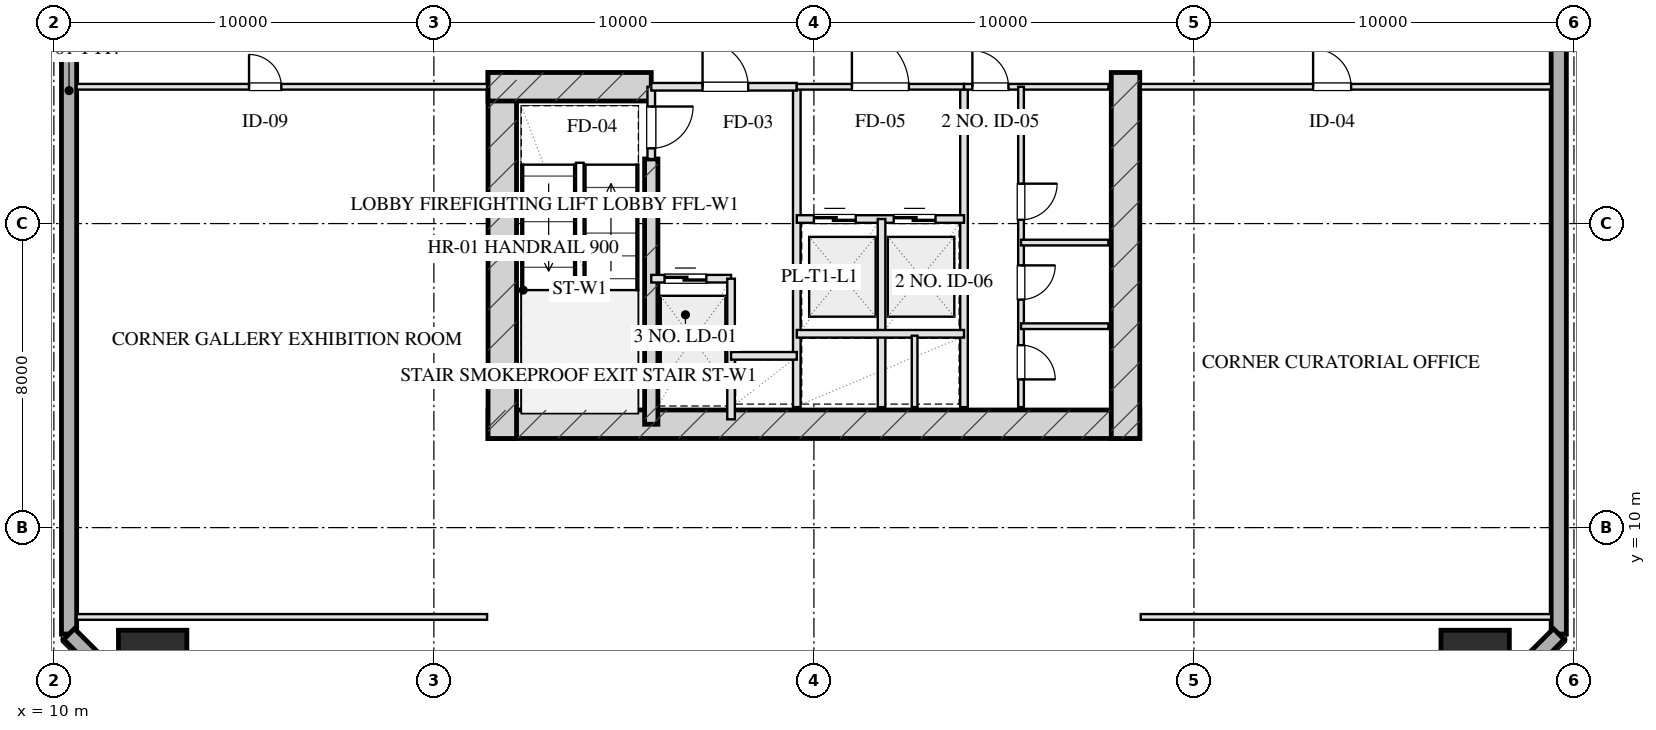
"""IFC4 building model, lengths in metres.
Left out: names, types, materials, properties, quantities, classifications, styles, units other than length and angle.
Written with IfcOpenShell. Run it as: python <this file> out.ifc"""

import sys

from ifc_helpers import new_model, si_unit, direction, frame, frame_2d, origin, origin_2d, place, context, subcontext, project, spatial, rectangle, hollow_rectangle, extrude, element, fill, save


model = new_model("IFC4")
c1 = context("Model", 3, precision=1e-05, world=origin(), true_north=direction((0.0, 1.0)))
c2 = subcontext(c1, "Body", "Model", "MODEL_VIEW")
j1 = project(units=[si_unit("LENGTHUNIT", "METRE"), si_unit("PLANEANGLEUNIT", "RADIAN")], contexts=[c1])
p1 = place(None, origin())
s1 = spatial("IfcSite", under=j1, at=p1, CompositionType="ELEMENT")
p2 = place(p1, origin())
s2 = spatial("IfcBuilding", under=s1, at=p2, CompositionType="ELEMENT")
p3 = place(p2, frame((0.0, 0.0, 34.0)))
s3 = spatial("IfcBuildingStorey", under=s2, at=p3, CompositionType="ELEMENT", Elevation=34.0)
p4 = place(p3, frame((21.425, 12.72, 0.0), z_axis=(0.0, 0.0, 1.0), x_axis=(1.0, 0.0, 0.0)))
e1 = element("IfcWall", 1, at=p4, inside=s3, PredefinedType="SHEAR", context=c2, shape_type="SweptSolid", body=[
    extrude(rectangle(XDim=17.15, YDim=0.75, at=frame_2d((8.575, 0.0))), origin(), (0.0, 0.0, 1.0), 4.0),
])
for number, where, z_axis, x_axis in (
    (2, (21.8, 21.975, 0.0), (0.0, 0.0, 1.0), (0.0, -1.0, 0.0)),
    (3, (38.2, 21.975, 0.0), (0.0, 0.0, 1.0), (0.0, -1.0, 0.0)),
):
    element("IfcWall", number, at=place(p3, frame(where, z_axis=z_axis, x_axis=x_axis)), inside=s3, PredefinedType="SHEAR", context=c2, shape_type="SweptSolid", body=[
        extrude(rectangle(XDim=9.63, YDim=0.75, at=frame_2d((4.815, 0.0))), origin(), (0.0, 0.0, 1.0), 4.0),
    ])
p5 = place(p3, frame((25.72, 19.7, 0.0), z_axis=(0.0, 0.0, 1.0), x_axis=(0.0, -1.0, 0.0)))
e4 = element("IfcWall", 4, at=p5, inside=s3, PredefinedType="SHEAR", context=c2, shape_type="SweptSolid", body=[
    extrude(rectangle(XDim=6.98, YDim=0.35, at=frame_2d((3.49, 0.0))), origin(), (0.0, 0.0, 1.0), 4.0),
])
p6 = place(p3, frame((21.425, 21.6, 0.0), z_axis=(0.0, 0.0, 1.0), x_axis=(1.0, 0.0, 0.0)))
e5 = element("IfcWall", 5, at=p6, inside=s3, PredefinedType="SHEAR", context=c2, shape_type="SweptSolid", body=[
    extrude(rectangle(XDim=4.295, YDim=0.75, at=frame_2d((2.147, 0.0))), origin(), (0.0, 0.0, 1.0), 4.0),
])
for number, where, z_axis, x_axis in (
    (6, (12.6, 6.4, 0.0), (0.0, 0.0, 1.0), (1.0, 0.0, 0.0)),
    (7, (47.4, 6.4, 0.0), (0.0, 0.0, 1.0), (1.0, 0.0, 0.0)),
):
    element("IfcColumn", number, at=place(p3, frame(where, z_axis=z_axis, x_axis=x_axis)), inside=s3, PredefinedType="COLUMN", context=c2, shape_type="SweptSolid", body=[
        extrude(hollow_rectangle(XDim=1.8, YDim=1.8, WallThickness=0.06, at=origin_2d()), origin(), (0.0, 0.0, 1.0), 4.001),
    ])
p7 = place(p3, frame((10.4, 7.2, 0.0), z_axis=(0.0, 0.0, 1.0), x_axis=(0.0, 1.0, 0.0)))
e8 = element("IfcWall", 8, at=p7, inside=s3, PredefinedType="SOLIDWALL", context=c2, shape_type="SweptSolid", body=[
    extrude(rectangle(XDim=53.6, YDim=0.4, at=frame_2d((26.8, 0.0))), origin(), (0.0, 0.0, 1.0), 3.16),
])
p8 = place(p7, frame((22.95, 0.0, 0.75)))
e9 = element("IfcOpeningElement", 9, at=p8, cuts=e8, PredefinedType="OPENING", context=c2, shape_type="SweptSolid", body=[
    extrude(rectangle(XDim=2.5, YDim=1.75, at=frame_2d((1.25, 0.875))), frame((0.0, 0.21, 0.0), z_axis=(0.0, -1.0, 0.0), x_axis=(1.0, 0.0, 0.0)), (0.0, 0.0, 1.0), 0.42),
])
p9 = place(p7, frame((29.35, 0.0, 0.0)))
e10 = element("IfcOpeningElement", 10, at=p9, cuts=e8, PredefinedType="OPENING", context=c2, shape_type="SweptSolid", body=[
    extrude(rectangle(XDim=1.1, YDim=2.15, at=frame_2d((0.55, 1.075))), frame((0.0, 0.21, 0.0), z_axis=(0.0, -1.0, 0.0), x_axis=(1.0, 0.0, 0.0)), (0.0, 0.0, 1.0), 0.42),
])
p10 = place(p3, frame((49.6, 60.8, 0.0), z_axis=(0.0, 0.0, 1.0), x_axis=(0.0, -1.0, 0.0)))
e11 = element("IfcWall", 11, at=p10, inside=s3, PredefinedType="SOLIDWALL", context=c2, shape_type="SweptSolid", body=[
    extrude(rectangle(XDim=53.6, YDim=0.4, at=frame_2d((26.8, 0.0))), origin(), (0.0, 0.0, 1.0), 3.16),
])
p11 = place(p10, frame((28.15, 0.0, 0.75)))
e12 = element("IfcOpeningElement", 12, at=p11, cuts=e11, PredefinedType="OPENING", context=c2, shape_type="SweptSolid", body=[
    extrude(rectangle(XDim=2.5, YDim=1.75, at=frame_2d((1.25, 0.875))), frame((0.0, 0.21, 0.0), z_axis=(0.0, -1.0, 0.0), x_axis=(1.0, 0.0, 0.0)), (0.0, 0.0, 1.0), 0.42),
])
p12 = place(p10, frame((23.15, 0.0, 0.0)))
e13 = element("IfcOpeningElement", 13, at=p12, cuts=e11, PredefinedType="OPENING", context=c2, shape_type="SweptSolid", body=[
    extrude(rectangle(XDim=1.1, YDim=2.15, at=frame_2d((0.55, 1.075))), frame((0.0, 0.21, 0.0), z_axis=(0.0, -1.0, 0.0), x_axis=(1.0, 0.0, 0.0)), (0.0, 0.0, 1.0), 0.42),
])
for number, where, z_axis, x_axis in (
    (14, (49.6, 7.2, 0.0), (0.0, 0.0, 1.0), (-0.707, -0.707, 0.0)),
    (15, (13.4, 4.2, 0.0), (0.0, 0.0, 1.0), (-0.707, 0.707, 0.0)),
):
    element("IfcWall", number, at=place(p3, frame(where, z_axis=z_axis, x_axis=x_axis)), inside=s3, PredefinedType="SOLIDWALL", context=c2, shape_type="SweptSolid", body=[
        extrude(rectangle(XDim=4.243, YDim=0.4, at=frame_2d((2.121, 0.0))), origin(), (0.0, 0.0, 1.0), 3.16),
    ])
p13 = place(p3, frame((25.72, 21.6, 0.0), z_axis=(0.0, 0.0, 1.0), x_axis=(0.0, -1.0, 0.0)))
e16 = element("IfcWall", 16, at=p13, inside=s3, PredefinedType="PARTITIONING", context=c2, shape_type="SweptSolid", body=[
    extrude(rectangle(XDim=1.9, YDim=0.2, at=frame_2d((0.95, 0.0))), origin(), (0.0, 0.0, 1.0), 3.725),
])
p14 = place(p13, frame((0.52, 0.0, 0.0)))
e17 = element("IfcOpeningElement", 17, at=p14, cuts=e16, PredefinedType="OPENING", context=c2, shape_type="SweptSolid", body=[
    extrude(rectangle(XDim=1.1, YDim=2.05, at=frame_2d((0.55, 1.025))), frame((0.0, 0.11, 0.0), z_axis=(0.0, -1.0, 0.0), x_axis=(1.0, 0.0, 0.0)), (0.0, 0.0, 1.0), 0.22),
])
p15 = place(p3, frame((29.55, 21.6, 0.0), z_axis=(0.0, 0.0, 1.0), x_axis=(0.0, -1.0, 0.0)))
e18 = element("IfcWall", 18, at=p15, inside=s3, PredefinedType="PARTITIONING", context=c2, shape_type="SweptSolid", body=[
    extrude(rectangle(XDim=8.43, YDim=0.2, at=frame_2d((4.215, 0.0))), origin(), (0.0, 0.0, 1.0), 3.725),
])
p16 = place(p3, frame((25.72, 21.6, 0.0), z_axis=(0.0, 0.0, 1.0), x_axis=(1.0, 0.0, 0.0)))
e19 = element("IfcWall", 19, at=p16, inside=s3, PredefinedType="PARTITIONING", context=c2, shape_type="SweptSolid", body=[
    extrude(rectangle(XDim=3.83, YDim=0.2, at=frame_2d((1.915, 0.0))), origin(), (0.0, 0.0, 1.0), 3.725),
])
p17 = place(p16, frame((1.35, 0.0, 0.0)))
e20 = element("IfcOpeningElement", 20, at=p17, cuts=e19, PredefinedType="OPENING", context=c2, shape_type="SweptSolid", body=[
    extrude(rectangle(XDim=1.2, YDim=2.05, at=frame_2d((0.6, 1.025))), frame((0.0, 0.11, 0.0), z_axis=(0.0, -1.0, 0.0), x_axis=(1.0, 0.0, 0.0)), (0.0, 0.0, 1.0), 0.22),
])
p18 = place(p3, frame((25.72, 16.55, 0.0), z_axis=(0.0, 0.0, 1.0), x_axis=(1.0, 0.0, 0.0)))
e21 = element("IfcWall", 21, at=p18, inside=s3, PredefinedType="PARTITIONING", context=c2, shape_type="SweptSolid", body=[
    extrude(rectangle(XDim=2.1, YDim=0.2, at=frame_2d((1.05, 0.0))), origin(), (0.0, 0.0, 1.0), 3.725),
])
p19 = place(p18, frame((0.35, 0.0, 0.0)))
e22 = element("IfcOpeningElement", 22, at=p19, cuts=e21, PredefinedType="OPENING", context=c2, shape_type="SweptSolid", body=[
    extrude(rectangle(XDim=1.1, YDim=2.05, at=frame_2d((0.55, 1.025))), frame((0.0, 0.11, 0.0), z_axis=(0.0, -1.0, 0.0), x_axis=(1.0, 0.0, 0.0)), (0.0, 0.0, 1.0), 0.22),
])
p20 = place(p3, frame((27.82, 16.55, 0.0), z_axis=(0.0, 0.0, 1.0), x_axis=(0.0, -1.0, 0.0)))
e23 = element("IfcWall", 23, at=p20, inside=s3, PredefinedType="PARTITIONING", context=c2, shape_type="SweptSolid", body=[
    extrude(rectangle(XDim=3.7, YDim=0.2, at=frame_2d((1.85, 0.0))), origin(), (0.0, 0.0, 1.0), 3.725),
])
p21 = place(p3, frame((27.82, 14.52, 0.0), z_axis=(0.0, 0.0, 1.0), x_axis=(1.0, 0.0, 0.0)))
e24 = element("IfcWall", 24, at=p21, inside=s3, PredefinedType="PARTITIONING", context=c2, shape_type="SweptSolid", body=[
    extrude(rectangle(XDim=1.73, YDim=0.2, at=frame_2d((0.865, 0.0))), origin(), (0.0, 0.0, 1.0), 3.725),
])
p22 = place(p3, frame((33.95, 21.6, 0.0), z_axis=(0.0, 0.0, 1.0), x_axis=(0.0, -1.0, 0.0)))
e25 = element("IfcWall", 25, at=p22, inside=s3, PredefinedType="PARTITIONING", context=c2, shape_type="SweptSolid", body=[
    extrude(rectangle(XDim=8.43, YDim=0.2, at=frame_2d((4.215, 0.0))), origin(), (0.0, 0.0, 1.0), 3.725),
])
p23 = place(p3, frame((29.55, 21.6, 0.0), z_axis=(0.0, 0.0, 1.0), x_axis=(1.0, 0.0, 0.0)))
e26 = element("IfcWall", 26, at=p23, inside=s3, PredefinedType="PARTITIONING", context=c2, shape_type="SweptSolid", body=[
    extrude(rectangle(XDim=4.4, YDim=0.15, at=frame_2d((2.2, 0.0))), origin(), (0.0, 0.0, 1.0), 3.725),
])
p24 = place(p23, frame((1.45, 0.0, 0.0)))
e27 = element("IfcOpeningElement", 27, at=p24, cuts=e26, PredefinedType="OPENING", context=c2, shape_type="SweptSolid", body=[
    extrude(rectangle(XDim=1.5, YDim=2.05, at=frame_2d((0.75, 1.025))), frame((0.0, 0.085, 0.0), z_axis=(0.0, -1.0, 0.0), x_axis=(1.0, 0.0, 0.0)), (0.0, 0.0, 1.0), 0.17),
])
p25 = place(p3, frame((29.55, 18.12, 0.0), z_axis=(0.0, 0.0, 1.0), x_axis=(1.0, 0.0, 0.0)))
e28 = element("IfcWall", 28, at=p25, inside=s3, PredefinedType="PARTITIONING", context=c2, shape_type="SweptSolid", body=[
    extrude(rectangle(XDim=4.4, YDim=0.2, at=frame_2d((2.2, 0.0))), origin(), (0.0, 0.0, 1.0), 3.725),
])
p26 = place(p25, frame((0.45, 0.0, 0.0)))
e29 = element("IfcOpeningElement", 29, at=p26, cuts=e28, PredefinedType="OPENING", context=c2, shape_type="SweptSolid", body=[
    extrude(rectangle(XDim=1.1, YDim=2.05, at=frame_2d((0.55, 1.025))), frame((0.0, 0.11, 0.0), z_axis=(0.0, -1.0, 0.0), x_axis=(1.0, 0.0, 0.0)), (0.0, 0.0, 1.0), 0.22),
])
p27 = place(p25, frame((2.55, 0.0, 0.0)))
e30 = element("IfcOpeningElement", 30, at=p27, cuts=e28, PredefinedType="OPENING", context=c2, shape_type="SweptSolid", body=[
    extrude(rectangle(XDim=1.1, YDim=2.05, at=frame_2d((0.55, 1.025))), frame((0.0, 0.11, 0.0), z_axis=(0.0, -1.0, 0.0), x_axis=(1.0, 0.0, 0.0)), (0.0, 0.0, 1.0), 0.22),
])
p28 = place(p3, frame((31.78, 18.12, 0.0), z_axis=(0.0, 0.0, 1.0), x_axis=(0.0, -1.0, 0.0)))
e31 = element("IfcWall", 31, at=p28, inside=s3, PredefinedType="PARTITIONING", context=c2, shape_type="SweptSolid", body=[
    extrude(rectangle(XDim=4.95, YDim=0.2, at=frame_2d((2.475, 0.0))), origin(), (0.0, 0.0, 1.0), 3.725),
])
p29 = place(p3, frame((29.55, 15.1, 0.0), z_axis=(0.0, 0.0, 1.0), x_axis=(1.0, 0.0, 0.0)))
e32 = element("IfcWall", 32, at=p29, inside=s3, PredefinedType="PARTITIONING", context=c2, shape_type="SweptSolid", body=[
    extrude(rectangle(XDim=4.4, YDim=0.2, at=frame_2d((2.2, 0.0))), origin(), (0.0, 0.0, 1.0), 3.725),
])
p30 = place(p3, frame((32.65, 15.05, 0.0), z_axis=(0.0, 0.0, 1.0), x_axis=(0.0, -1.0, 0.0)))
e33 = element("IfcWall", 33, at=p30, inside=s3, PredefinedType="PARTITIONING", context=c2, shape_type="SweptSolid", body=[
    extrude(rectangle(XDim=1.88, YDim=0.15, at=frame_2d((0.94, 0.0))), origin(), (0.0, 0.0, 1.0), 3.725),
])
p31 = place(p3, frame((33.95, 21.6, 0.0), z_axis=(0.0, 0.0, 1.0), x_axis=(1.0, 0.0, 0.0)))
e34 = element("IfcWall", 34, at=p31, inside=s3, PredefinedType="PARTITIONING", context=c2, shape_type="SweptSolid", body=[
    extrude(rectangle(XDim=3.8, YDim=0.15, at=frame_2d((1.9, 0.0))), origin(), (0.0, 0.0, 1.0), 3.725),
])
p32 = place(p31, frame((0.22, 0.0, 0.0)))
e35 = element("IfcOpeningElement", 35, at=p32, cuts=e34, PredefinedType="OPENING", context=c2, shape_type="SweptSolid", body=[
    extrude(rectangle(XDim=0.95, YDim=2.05, at=frame_2d((0.475, 1.025))), frame((0.0, 0.085, 0.0), z_axis=(0.0, -1.0, 0.0), x_axis=(1.0, 0.0, 0.0)), (0.0, 0.0, 1.0), 0.17),
])
p33 = place(p3, frame((35.45, 21.6, 0.0), z_axis=(0.0, 0.0, 1.0), x_axis=(0.0, -1.0, 0.0)))
e36 = element("IfcWall", 36, at=p33, inside=s3, PredefinedType="PARTITIONING", context=c2, shape_type="SweptSolid", body=[
    extrude(rectangle(XDim=8.43, YDim=0.15, at=frame_2d((4.215, 0.0))), origin(), (0.0, 0.0, 1.0), 3.365),
])
p34 = place(p33, frame((2.55, 0.0, 0.0)))
e37 = element("IfcOpeningElement", 37, at=p34, cuts=e36, PredefinedType="OPENING", context=c2, shape_type="SweptSolid", body=[
    extrude(rectangle(XDim=0.95, YDim=2.05, at=frame_2d((0.475, 1.025))), frame((0.0, 0.085, 0.0), z_axis=(0.0, -1.0, 0.0), x_axis=(1.0, 0.0, 0.0)), (0.0, 0.0, 1.0), 0.17),
])
p35 = place(p33, frame((4.7, 0.0, 0.0)))
e38 = element("IfcOpeningElement", 38, at=p35, cuts=e36, PredefinedType="OPENING", context=c2, shape_type="SweptSolid", body=[
    extrude(rectangle(XDim=0.9, YDim=2.05, at=frame_2d((0.45, 1.025))), frame((0.0, 0.085, 0.0), z_axis=(0.0, -1.0, 0.0), x_axis=(1.0, 0.0, 0.0)), (0.0, 0.0, 1.0), 0.17),
])
p36 = place(p33, frame((6.8, 0.0, 0.0)))
e39 = element("IfcOpeningElement", 39, at=p36, cuts=e36, PredefinedType="OPENING", context=c2, shape_type="SweptSolid", body=[
    extrude(rectangle(XDim=0.9, YDim=2.05, at=frame_2d((0.45, 1.025))), frame((0.0, 0.085, 0.0), z_axis=(0.0, -1.0, 0.0), x_axis=(1.0, 0.0, 0.0)), (0.0, 0.0, 1.0), 0.17),
])
for number, where, z_axis, x_axis in (
    (40, (35.45, 17.5, 0.0), (0.0, 0.0, 1.0), (1.0, 0.0, 0.0)),
    (41, (35.45, 15.3, 0.0), (0.0, 0.0, 1.0), (1.0, 0.0, 0.0)),
):
    element("IfcWall", number, at=place(p3, frame(where, z_axis=z_axis, x_axis=x_axis)), inside=s3, PredefinedType="PARTITIONING", context=c2, shape_type="SweptSolid", body=[
        extrude(rectangle(XDim=2.3, YDim=0.15, at=frame_2d((1.15, 0.0))), origin(), (0.0, 0.0, 1.0), 3.725),
    ])
p37 = place(p3, frame((10.6, 7.65, 0.0), z_axis=(0.0, 0.0, 1.0), x_axis=(1.0, 0.0, 0.0)))
e42 = element("IfcWall", 42, at=p37, inside=s3, PredefinedType="PARTITIONING", context=c2, shape_type="SweptSolid", body=[
    extrude(rectangle(XDim=10.8, YDim=0.15, at=frame_2d((5.4, 0.0))), origin(), (0.0, 0.0, 1.0), 3.725),
])
p38 = place(p3, frame((10.6, 21.6, 0.0), z_axis=(0.0, 0.0, 1.0), x_axis=(1.0, 0.0, 0.0)))
e43 = element("IfcWall", 43, at=p38, inside=s3, PredefinedType="PARTITIONING", context=c2, shape_type="SweptSolid", body=[
    extrude(rectangle(XDim=10.8, YDim=0.15, at=frame_2d((5.4, 0.0))), origin(), (0.0, 0.0, 1.0), 3.725),
])
p39 = place(p38, frame((4.536, 0.0, 0.0)))
e44 = element("IfcOpeningElement", 44, at=p39, cuts=e43, PredefinedType="OPENING", context=c2, shape_type="SweptSolid", body=[
    extrude(rectangle(XDim=0.85, YDim=2.05, at=frame_2d((0.425, 1.025))), frame((0.0, 0.085, 0.0), z_axis=(0.0, -1.0, 0.0), x_axis=(1.0, 0.0, 0.0)), (0.0, 0.0, 1.0), 0.17),
])
p40 = place(p3, frame((38.6, 7.65, 0.0), z_axis=(0.0, 0.0, 1.0), x_axis=(1.0, 0.0, 0.0)))
e45 = element("IfcWall", 45, at=p40, inside=s3, PredefinedType="PARTITIONING", context=c2, shape_type="SweptSolid", body=[
    extrude(rectangle(XDim=10.8, YDim=0.15, at=frame_2d((5.4, 0.0))), origin(), (0.0, 0.0, 1.0), 3.725),
])
p41 = place(p3, frame((38.6, 21.6, 0.0), z_axis=(0.0, 0.0, 1.0), x_axis=(1.0, 0.0, 0.0)))
e46 = element("IfcWall", 46, at=p41, inside=s3, PredefinedType="PARTITIONING", context=c2, shape_type="SweptSolid", body=[
    extrude(rectangle(XDim=10.8, YDim=0.15, at=frame_2d((5.4, 0.0))), origin(), (0.0, 0.0, 1.0), 3.725),
])
p42 = place(p41, frame((4.536, 0.0, 0.0)))
e47 = element("IfcOpeningElement", 47, at=p42, cuts=e46, PredefinedType="OPENING", context=c2, shape_type="SweptSolid", body=[
    extrude(rectangle(XDim=1.0, YDim=2.05, at=frame_2d((0.5, 1.025))), frame((0.0, 0.085, 0.0), z_axis=(0.0, -1.0, 0.0), x_axis=(1.0, 0.0, 0.0)), (0.0, 0.0, 1.0), 0.17),
])
p43 = place(p14, origin())
e48 = element("IfcDoor", 48, at=p43, inside=s3, OperationType="SINGLE_SWING_LEFT", PredefinedType="DOOR", context=c2, shape_type="SweptSolid", body=[
    extrude(rectangle(XDim=1.1, YDim=2.05, at=frame_2d((0.55, 1.025))), frame((0.0, 0.025, 0.0), z_axis=(0.0, -1.0, 0.0), x_axis=(1.0, 0.0, 0.0)), (0.0, 0.0, 1.0), 0.05),
])
fill(e17, e48)
p44 = place(p17, origin())
e49 = element("IfcDoor", 49, at=p44, inside=s3, OperationType="SINGLE_SWING_LEFT", PredefinedType="DOOR", context=c2, shape_type="SweptSolid", body=[
    extrude(rectangle(XDim=1.2, YDim=2.05, at=frame_2d((0.6, 1.025))), frame((0.0, 0.025, 0.0), z_axis=(0.0, -1.0, 0.0), x_axis=(1.0, 0.0, 0.0)), (0.0, 0.0, 1.0), 0.05),
])
fill(e20, e49)
p45 = place(p19, origin())
e50 = element("IfcDoor", 50, at=p45, inside=s3, OperationType="DOUBLE_DOOR_SLIDING", PredefinedType="DOOR", context=c2, shape_type="SweptSolid", body=[
    extrude(rectangle(XDim=1.1, YDim=2.05, at=frame_2d((0.55, 1.025))), frame((0.0, 0.025, 0.0), z_axis=(0.0, -1.0, 0.0), x_axis=(1.0, 0.0, 0.0)), (0.0, 0.0, 1.0), 0.05),
])
fill(e22, e50)
p46 = place(p24, origin())
e51 = element("IfcDoor", 51, at=p46, inside=s3, OperationType="SINGLE_SWING_LEFT", PredefinedType="DOOR", context=c2, shape_type="SweptSolid", body=[
    extrude(rectangle(XDim=1.5, YDim=2.05, at=frame_2d((0.75, 1.025))), frame((0.0, 0.025, 0.0), z_axis=(0.0, -1.0, 0.0), x_axis=(1.0, 0.0, 0.0)), (0.0, 0.0, 1.0), 0.05),
])
fill(e27, e51)
p47 = place(p26, origin())
e52 = element("IfcDoor", 52, at=p47, inside=s3, OperationType="DOUBLE_DOOR_SLIDING", PredefinedType="DOOR", context=c2, shape_type="SweptSolid", body=[
    extrude(rectangle(XDim=1.1, YDim=2.05, at=frame_2d((0.55, 1.025))), frame((0.0, 0.025, 0.0), z_axis=(0.0, -1.0, 0.0), x_axis=(1.0, 0.0, 0.0)), (0.0, 0.0, 1.0), 0.05),
])
fill(e29, e52)
p48 = place(p27, origin())
e53 = element("IfcDoor", 53, at=p48, inside=s3, OperationType="DOUBLE_DOOR_SLIDING", PredefinedType="DOOR", context=c2, shape_type="SweptSolid", body=[
    extrude(rectangle(XDim=1.1, YDim=2.05, at=frame_2d((0.55, 1.025))), frame((0.0, 0.025, 0.0), z_axis=(0.0, -1.0, 0.0), x_axis=(1.0, 0.0, 0.0)), (0.0, 0.0, 1.0), 0.05),
])
fill(e30, e53)
p49 = place(p32, origin())
e54 = element("IfcDoor", 54, at=p49, inside=s3, OperationType="SINGLE_SWING_LEFT", PredefinedType="DOOR", context=c2, shape_type="SweptSolid", body=[
    extrude(rectangle(XDim=0.95, YDim=2.05, at=frame_2d((0.475, 1.025))), frame((0.0, 0.025, 0.0), z_axis=(0.0, -1.0, 0.0), x_axis=(1.0, 0.0, 0.0)), (0.0, 0.0, 1.0), 0.05),
])
fill(e35, e54)
p50 = place(p34, origin())
e55 = element("IfcDoor", 55, at=p50, inside=s3, OperationType="SINGLE_SWING_LEFT", PredefinedType="DOOR", context=c2, shape_type="SweptSolid", body=[
    extrude(rectangle(XDim=0.95, YDim=2.05, at=frame_2d((0.475, 1.025))), frame((0.0, 0.025, 0.0), z_axis=(0.0, -1.0, 0.0), x_axis=(1.0, 0.0, 0.0)), (0.0, 0.0, 1.0), 0.05),
])
fill(e37, e55)
p51 = place(p35, origin())
e56 = element("IfcDoor", 56, at=p51, inside=s3, OperationType="SINGLE_SWING_LEFT", PredefinedType="DOOR", context=c2, shape_type="SweptSolid", body=[
    extrude(rectangle(XDim=0.9, YDim=2.05, at=frame_2d((0.45, 1.025))), frame((0.0, 0.025, 0.0), z_axis=(0.0, -1.0, 0.0), x_axis=(1.0, 0.0, 0.0)), (0.0, 0.0, 1.0), 0.05),
])
fill(e38, e56)
p52 = place(p36, origin())
e57 = element("IfcDoor", 57, at=p52, inside=s3, OperationType="SINGLE_SWING_RIGHT", PredefinedType="DOOR", context=c2, shape_type="SweptSolid", body=[
    extrude(rectangle(XDim=0.9, YDim=2.05, at=frame_2d((0.45, 1.025))), frame((0.0, 0.025, 0.0), z_axis=(0.0, -1.0, 0.0), x_axis=(1.0, 0.0, 0.0)), (0.0, 0.0, 1.0), 0.05),
])
fill(e39, e57)
p53 = place(p39, origin())
e58 = element("IfcDoor", 58, at=p53, inside=s3, OperationType="SINGLE_SWING_LEFT", PredefinedType="DOOR", context=c2, shape_type="SweptSolid", body=[
    extrude(rectangle(XDim=0.85, YDim=2.05, at=frame_2d((0.425, 1.025))), frame((0.0, 0.025, 0.0), z_axis=(0.0, -1.0, 0.0), x_axis=(1.0, 0.0, 0.0)), (0.0, 0.0, 1.0), 0.05),
])
fill(e44, e58)
p54 = place(p42, origin())
e59 = element("IfcDoor", 59, at=p54, inside=s3, OperationType="SINGLE_SWING_LEFT", PredefinedType="DOOR", context=c2, shape_type="SweptSolid", body=[
    extrude(rectangle(XDim=1.0, YDim=2.05, at=frame_2d((0.5, 1.025))), frame((0.0, 0.025, 0.0), z_axis=(0.0, -1.0, 0.0), x_axis=(1.0, 0.0, 0.0)), (0.0, 0.0, 1.0), 0.05),
])
fill(e47, e59)
save(model, sys.argv[1])
